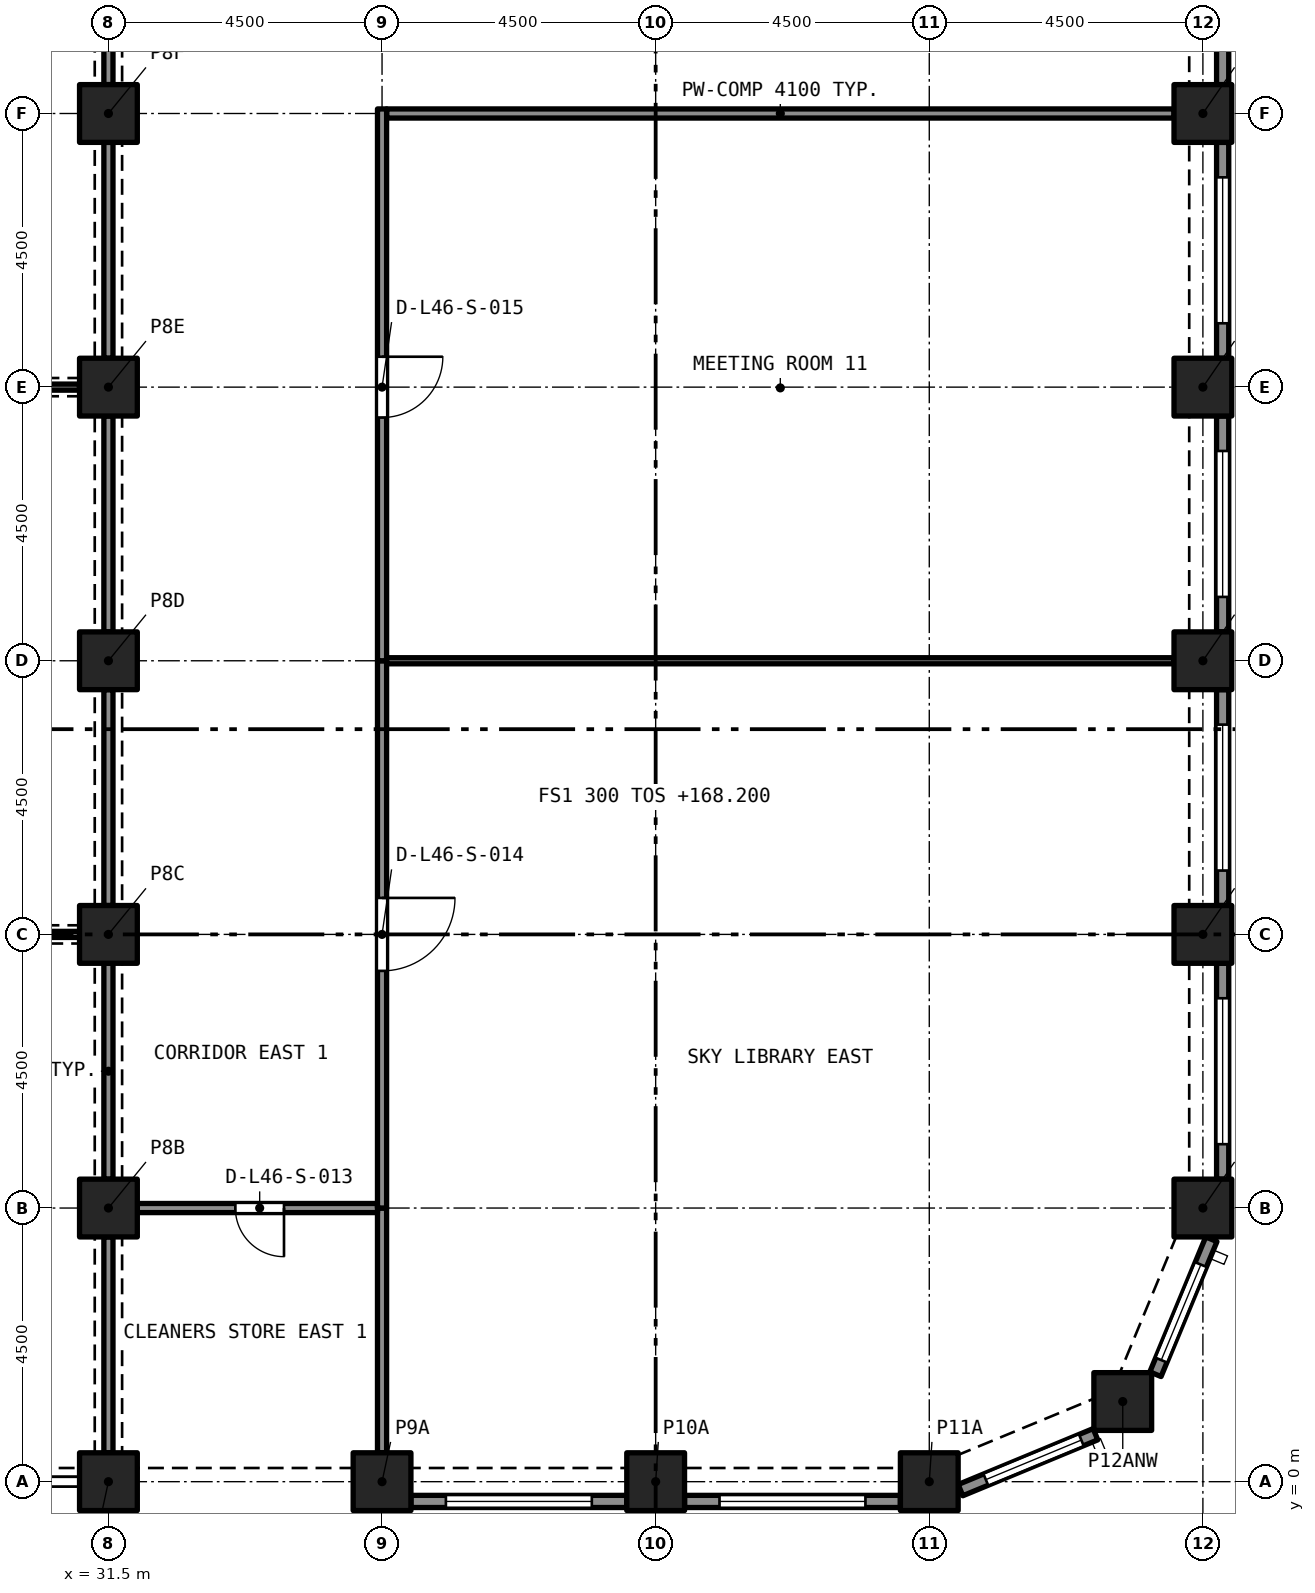
"""IFC4 building model, lengths in metres.
Left out: names, types, materials, properties, quantities, classifications, styles, units other than length and angle.
Written with IfcOpenShell. Run it as: python <this file> out.ifc"""

import sys

from ifc_helpers import new_model, si_unit, direction, frame, frame_2d, origin, origin_2d, place, context, subcontext, project, spatial, rectangle, extrude, element, fill, save


model = new_model("IFC4")
c1 = context("Model", 3, precision=1e-05, world=origin(), true_north=direction((0.0, 1.0)))
c2 = subcontext(c1, "Body", "Model", "MODEL_VIEW")
j1 = project(units=[si_unit("LENGTHUNIT", "METRE"), si_unit("PLANEANGLEUNIT", "RADIAN")], contexts=[c1])
p1 = place(None, origin())
s1 = spatial("IfcSite", under=j1, at=p1, CompositionType="ELEMENT")
p2 = place(p1, origin())
s2 = spatial("IfcBuilding", under=s1, at=p2, CompositionType="ELEMENT")
p3 = place(p2, frame((0.0, 0.0, 168.2)))
s3 = spatial("IfcBuildingStorey", under=s2, at=p3, CompositionType="ELEMENT", Elevation=168.2)
for number, where, z_axis, x_axis in (
    (1, (31.5, 0.0, 0.0), (0.0, 0.0, 1.0), (1.0, 0.0, 0.0)),
    (2, (36.0, 0.0, 0.0), (0.0, 0.0, 1.0), (1.0, 0.0, 0.0)),
    (3, (40.5, 0.0, 0.0), (0.0, 0.0, 1.0), (1.0, 0.0, 0.0)),
    (4, (45.0, 0.0, 0.0), (0.0, 0.0, 1.0), (1.0, 0.0, 0.0)),
    (5, (48.182, 1.318, 0.0), (0.0, 0.0, 1.0), (1.0, 0.0, 0.0)),
    (6, (31.5, 4.5, 0.0), (0.0, 0.0, 1.0), (1.0, 0.0, 0.0)),
    (7, (49.5, 4.5, 0.0), (0.0, 0.0, 1.0), (1.0, 0.0, 0.0)),
    (8, (31.5, 9.0, 0.0), (0.0, 0.0, 1.0), (1.0, 0.0, 0.0)),
    (9, (49.5, 9.0, 0.0), (0.0, 0.0, 1.0), (1.0, 0.0, 0.0)),
    (10, (31.5, 13.5, 0.0), (0.0, 0.0, 1.0), (1.0, 0.0, 0.0)),
    (11, (49.5, 13.5, 0.0), (0.0, 0.0, 1.0), (1.0, 0.0, 0.0)),
    (12, (31.5, 18.0, 0.0), (0.0, 0.0, 1.0), (1.0, 0.0, 0.0)),
    (13, (49.5, 18.0, 0.0), (0.0, 0.0, 1.0), (1.0, 0.0, 0.0)),
    (14, (31.5, 22.5, 0.0), (0.0, 0.0, 1.0), (1.0, 0.0, 0.0)),
    (15, (49.5, 22.5, 0.0), (0.0, 0.0, 1.0), (1.0, 0.0, 0.0)),
):
    element("IfcColumn", number, at=place(p3, frame(where, z_axis=z_axis, x_axis=x_axis)), inside=s3, PredefinedType="COLUMN", context=c2, shape_type="SweptSolid", body=[
        extrude(rectangle(XDim=0.95, YDim=0.95, at=origin_2d()), origin(), (0.0, 0.0, 1.0), 4.4),
    ])
p4 = place(p3, frame((40.025, -0.325, 0.0), z_axis=(0.0, 0.0, 1.0), x_axis=(-1.0, 0.0, 0.0)))
e16 = element("IfcWall", 16, at=p4, inside=s3, PredefinedType="SOLIDWALL", context=c2, shape_type="SweptSolid", body=[
    extrude(rectangle(XDim=3.55, YDim=0.2, at=frame_2d((1.775, 0.0))), origin(), (0.0, 0.0, 1.0), 4.4),
])
p5 = place(p4, frame((0.575, 0.0, 0.45)))
e17 = element("IfcOpeningElement", 17, at=p5, cuts=e16, PredefinedType="OPENING", context=c2, shape_type="SweptSolid", body=[
    extrude(rectangle(XDim=2.4, YDim=2.55, at=frame_2d((1.2, 1.275))), frame((0.0, 0.11, 0.0), z_axis=(0.0, -1.0, 0.0), x_axis=(1.0, 0.0, 0.0)), (0.0, 0.0, 1.0), 0.22),
])
p6 = place(p3, frame((44.525, -0.325, 0.0), z_axis=(0.0, 0.0, 1.0), x_axis=(-1.0, 0.0, 0.0)))
e18 = element("IfcWall", 18, at=p6, inside=s3, PredefinedType="SOLIDWALL", context=c2, shape_type="SweptSolid", body=[
    extrude(rectangle(XDim=3.55, YDim=0.2, at=frame_2d((1.775, 0.0))), origin(), (0.0, 0.0, 1.0), 4.4),
])
p7 = place(p6, frame((0.575, 0.0, 0.45)))
e19 = element("IfcOpeningElement", 19, at=p7, cuts=e18, PredefinedType="OPENING", context=c2, shape_type="SweptSolid", body=[
    extrude(rectangle(XDim=2.4, YDim=2.55, at=frame_2d((1.2, 1.275))), frame((0.0, 0.11, 0.0), z_axis=(0.0, -1.0, 0.0), x_axis=(1.0, 0.0, 0.0)), (0.0, 0.0, 1.0), 0.22),
])
p8 = place(p3, frame((47.733, 0.78, 0.0), z_axis=(0.0, 0.0, 1.0), x_axis=(-0.923880599843, -0.382680855588, 0.0)))
e20 = element("IfcWall", 20, at=p8, inside=s3, PredefinedType="SOLIDWALL", context=c2, shape_type="SweptSolid", body=[
    extrude(rectangle(XDim=2.403, YDim=0.2, at=frame_2d((1.201, 0.0))), origin(), (0.0, 0.0, 1.0), 4.4),
])
p9 = place(p8, frame((0.251, 0.0, 0.45)))
e21 = element("IfcOpeningElement", 21, at=p9, cuts=e20, PredefinedType="OPENING", context=c2, shape_type="SweptSolid", body=[
    extrude(rectangle(XDim=1.7, YDim=2.55, at=frame_2d((0.85, 1.275))), frame((0.0, 0.11, 0.0), z_axis=(0.0, -1.0, 0.0), x_axis=(1.0, 0.0, 0.0)), (0.0, 0.0, 1.0), 0.22),
])
p10 = place(p3, frame((49.639, 3.987, 0.0), z_axis=(0.0, 0.0, 1.0), x_axis=(-0.382680855588, -0.923880599843, 0.0)))
e22 = element("IfcWall", 22, at=p10, inside=s3, PredefinedType="SOLIDWALL", context=c2, shape_type="SweptSolid", body=[
    extrude(rectangle(XDim=2.403, YDim=0.2, at=frame_2d((1.201, 0.0))), origin(), (0.0, 0.0, 1.0), 4.4),
])
p11 = place(p10, frame((0.451, 0.0, 0.45)))
e23 = element("IfcOpeningElement", 23, at=p11, cuts=e22, PredefinedType="OPENING", context=c2, shape_type="SweptSolid", body=[
    extrude(rectangle(XDim=1.7, YDim=2.55, at=frame_2d((0.85, 1.275))), frame((0.0, 0.11, 0.0), z_axis=(0.0, -1.0, 0.0), x_axis=(1.0, 0.0, 0.0)), (0.0, 0.0, 1.0), 0.22),
])
p12 = place(p3, frame((49.825, 8.525, 0.0), z_axis=(0.0, 0.0, 1.0), x_axis=(0.0, -1.0, 0.0)))
e24 = element("IfcWall", 24, at=p12, inside=s3, PredefinedType="SOLIDWALL", context=c2, shape_type="SweptSolid", body=[
    extrude(rectangle(XDim=3.55, YDim=0.2, at=frame_2d((1.775, 0.0))), origin(), (0.0, 0.0, 1.0), 4.4),
])
p13 = place(p12, frame((0.575, 0.0, 0.45)))
e25 = element("IfcOpeningElement", 25, at=p13, cuts=e24, PredefinedType="OPENING", context=c2, shape_type="SweptSolid", body=[
    extrude(rectangle(XDim=2.4, YDim=2.55, at=frame_2d((1.2, 1.275))), frame((0.0, 0.11, 0.0), z_axis=(0.0, -1.0, 0.0), x_axis=(1.0, 0.0, 0.0)), (0.0, 0.0, 1.0), 0.22),
])
p14 = place(p3, frame((49.825, 13.025, 0.0), z_axis=(0.0, 0.0, 1.0), x_axis=(0.0, -1.0, 0.0)))
e26 = element("IfcWall", 26, at=p14, inside=s3, PredefinedType="SOLIDWALL", context=c2, shape_type="SweptSolid", body=[
    extrude(rectangle(XDim=3.55, YDim=0.2, at=frame_2d((1.775, 0.0))), origin(), (0.0, 0.0, 1.0), 4.4),
])
p15 = place(p14, frame((0.575, 0.0, 0.45)))
e27 = element("IfcOpeningElement", 27, at=p15, cuts=e26, PredefinedType="OPENING", context=c2, shape_type="SweptSolid", body=[
    extrude(rectangle(XDim=2.4, YDim=2.55, at=frame_2d((1.2, 1.275))), frame((0.0, 0.11, 0.0), z_axis=(0.0, -1.0, 0.0), x_axis=(1.0, 0.0, 0.0)), (0.0, 0.0, 1.0), 0.22),
])
p16 = place(p3, frame((49.825, 17.525, 0.0), z_axis=(0.0, 0.0, 1.0), x_axis=(0.0, -1.0, 0.0)))
e28 = element("IfcWall", 28, at=p16, inside=s3, PredefinedType="SOLIDWALL", context=c2, shape_type="SweptSolid", body=[
    extrude(rectangle(XDim=3.55, YDim=0.2, at=frame_2d((1.775, 0.0))), origin(), (0.0, 0.0, 1.0), 4.4),
])
p17 = place(p16, frame((0.575, 0.0, 0.45)))
e29 = element("IfcOpeningElement", 29, at=p17, cuts=e28, PredefinedType="OPENING", context=c2, shape_type="SweptSolid", body=[
    extrude(rectangle(XDim=2.4, YDim=2.55, at=frame_2d((1.2, 1.275))), frame((0.0, 0.11, 0.0), z_axis=(0.0, -1.0, 0.0), x_axis=(1.0, 0.0, 0.0)), (0.0, 0.0, 1.0), 0.22),
])
p18 = place(p3, frame((49.825, 22.025, 0.0), z_axis=(0.0, 0.0, 1.0), x_axis=(0.0, -1.0, 0.0)))
e30 = element("IfcWall", 30, at=p18, inside=s3, PredefinedType="SOLIDWALL", context=c2, shape_type="SweptSolid", body=[
    extrude(rectangle(XDim=3.55, YDim=0.2, at=frame_2d((1.775, 0.0))), origin(), (0.0, 0.0, 1.0), 4.4),
])
p19 = place(p18, frame((0.575, 0.0, 0.45)))
e31 = element("IfcOpeningElement", 31, at=p19, cuts=e30, PredefinedType="OPENING", context=c2, shape_type="SweptSolid", body=[
    extrude(rectangle(XDim=2.4, YDim=2.55, at=frame_2d((1.2, 1.275))), frame((0.0, 0.11, 0.0), z_axis=(0.0, -1.0, 0.0), x_axis=(1.0, 0.0, 0.0)), (0.0, 0.0, 1.0), 0.22),
])
p20 = place(p3, frame((49.825, 26.525, 0.0), z_axis=(0.0, 0.0, 1.0), x_axis=(0.0, -1.0, 0.0)))
e32 = element("IfcWall", 32, at=p20, inside=s3, PredefinedType="SOLIDWALL", context=c2, shape_type="SweptSolid", body=[
    extrude(rectangle(XDim=3.55, YDim=0.2, at=frame_2d((1.775, 0.0))), origin(), (0.0, 0.0, 1.0), 4.4),
])
p21 = place(p20, frame((0.575, 0.0, 0.45)))
e33 = element("IfcOpeningElement", 33, at=p21, cuts=e32, PredefinedType="OPENING", context=c2, shape_type="SweptSolid", body=[
    extrude(rectangle(XDim=2.4, YDim=2.55, at=frame_2d((1.2, 1.275))), frame((0.0, 0.11, 0.0), z_axis=(0.0, -1.0, 0.0), x_axis=(1.0, 0.0, 0.0)), (0.0, 0.0, 1.0), 0.22),
])
p22 = place(p3, frame((18.475, 9.0, 0.0), z_axis=(0.0, 0.0, 1.0), x_axis=(1.0, 0.0, 0.0)))
e34 = element("IfcWall", 34, at=p22, inside=s3, PredefinedType="PARTITIONING", context=c2, shape_type="SweptSolid", body=[
    extrude(rectangle(XDim=12.55, YDim=0.1, at=frame_2d((6.275, 0.0))), origin(), (0.0, 0.0, 1.0), 3.95),
])
for number, where, z_axis, x_axis in (
    (35, (31.5, 0.475, 0.0), (0.0, 0.0, 1.0), (0.0, 1.0, 0.0)),
    (36, (31.5, 4.975, 0.0), (0.0, 0.0, 1.0), (0.0, 1.0, 0.0)),
):
    element("IfcWall", number, at=place(p3, frame(where, z_axis=z_axis, x_axis=x_axis)), inside=s3, PredefinedType="PARTITIONING", context=c2, shape_type="SweptSolid", body=[
        extrude(rectangle(XDim=3.55, YDim=0.15, at=frame_2d((1.775, 0.0))), origin(), (0.0, 0.0, 1.0), 3.58),
    ])
p23 = place(p3, frame((18.475, 18.0, 0.0), z_axis=(0.0, 0.0, 1.0), x_axis=(1.0, 0.0, 0.0)))
e37 = element("IfcWall", 37, at=p23, inside=s3, PredefinedType="PARTITIONING", context=c2, shape_type="SweptSolid", body=[
    extrude(rectangle(XDim=12.55, YDim=0.1, at=frame_2d((6.275, 0.0))), origin(), (0.0, 0.0, 1.0), 3.95),
])
for number, where, z_axis, x_axis in (
    (38, (31.5, 13.975, 0.0), (0.0, 0.0, 1.0), (0.0, 1.0, 0.0)),
    (39, (31.5, 9.475, 0.0), (0.0, 0.0, 1.0), (0.0, 1.0, 0.0)),
):
    element("IfcWall", number, at=place(p3, frame(where, z_axis=z_axis, x_axis=x_axis)), inside=s3, PredefinedType="PARTITIONING", context=c2, shape_type="SweptSolid", body=[
        extrude(rectangle(XDim=3.55, YDim=0.15, at=frame_2d((1.775, 0.0))), origin(), (0.0, 0.0, 1.0), 3.58),
    ])
p24 = place(p3, frame((31.5, 22.975, 0.0), z_axis=(0.0, 0.0, 1.0), x_axis=(0.0, 1.0, 0.0)))
e40 = element("IfcWall", 40, at=p24, inside=s3, PredefinedType="PARTITIONING", context=c2, shape_type="SweptSolid", body=[
    extrude(rectangle(XDim=3.55, YDim=0.15, at=frame_2d((1.775, 0.0))), origin(), (0.0, 0.0, 1.0), 3.58),
])
p25 = place(p24, frame((1.175, 0.0, 0.0)))
e41 = element("IfcOpeningElement", 41, at=p25, cuts=e40, PredefinedType="OPENING", context=c2, shape_type="SweptSolid", body=[
    extrude(rectangle(XDim=1.2, YDim=2.1, at=frame_2d((0.6, 1.05))), frame((0.0, 0.085, 0.0), z_axis=(0.0, -1.0, 0.0), x_axis=(1.0, 0.0, 0.0)), (0.0, 0.0, 1.0), 0.17),
])
p26 = place(p3, frame((31.5, 18.475, 0.0), z_axis=(0.0, 0.0, 1.0), x_axis=(0.0, 1.0, 0.0)))
e42 = element("IfcWall", 42, at=p26, inside=s3, PredefinedType="PARTITIONING", context=c2, shape_type="SweptSolid", body=[
    extrude(rectangle(XDim=3.55, YDim=0.15, at=frame_2d((1.775, 0.0))), origin(), (0.0, 0.0, 1.0), 3.58),
])
p27 = place(p3, frame((36.075, 22.5, 0.0), z_axis=(0.0, 0.0, 1.0), x_axis=(1.0, 0.0, 0.0)))
e43 = element("IfcWall", 43, at=p27, inside=s3, PredefinedType="PARTITIONING", context=c2, shape_type="SweptSolid", body=[
    extrude(rectangle(XDim=12.95, YDim=0.15, at=frame_2d((6.475, 0.0))), origin(), (0.0, 0.0, 1.0), 4.1),
])
p28 = place(p3, frame((36.0, 0.475, 0.0), z_axis=(0.0, 0.0, 1.0), x_axis=(0.0, 1.0, 0.0)))
e44 = element("IfcWall", 44, at=p28, inside=s3, PredefinedType="PARTITIONING", context=c2, shape_type="SweptSolid", body=[
    extrude(rectangle(XDim=4.025, YDim=0.15, at=frame_2d((2.012, 0.0))), origin(), (0.0, 0.0, 1.0), 4.1),
])
p29 = place(p3, frame((35.925, 4.5, 0.0), z_axis=(0.0, 0.0, 1.0), x_axis=(-1.0, 0.0, 0.0)))
e45 = element("IfcWall", 45, at=p29, inside=s3, PredefinedType="PARTITIONING", context=c2, shape_type="SweptSolid", body=[
    extrude(rectangle(XDim=3.95, YDim=0.15, at=frame_2d((1.975, 0.0))), origin(), (0.0, 0.0, 1.0), 4.1),
])
p30 = place(p29, frame((1.538, 0.0, 0.0)))
e46 = element("IfcOpeningElement", 46, at=p30, cuts=e45, PredefinedType="OPENING", context=c2, shape_type="SweptSolid", body=[
    extrude(rectangle(XDim=0.8, YDim=2.1, at=frame_2d((0.4, 1.05))), frame((0.0, 0.085, 0.0), z_axis=(0.0, -1.0, 0.0), x_axis=(1.0, 0.0, 0.0)), (0.0, 0.0, 1.0), 0.17),
])
p31 = place(p3, frame((36.0, 13.5, 0.0), z_axis=(0.0, 0.0, 1.0), x_axis=(0.0, -1.0, 0.0)))
e47 = element("IfcWall", 47, at=p31, inside=s3, PredefinedType="PARTITIONING", context=c2, shape_type="SweptSolid", body=[
    extrude(rectangle(XDim=9.0, YDim=0.15, at=frame_2d((4.5, 0.0))), origin(), (0.0, 0.0, 1.0), 4.1),
])
p32 = place(p31, frame((3.9, 0.0, 0.0)))
e48 = element("IfcOpeningElement", 48, at=p32, cuts=e47, PredefinedType="OPENING", context=c2, shape_type="SweptSolid", body=[
    extrude(rectangle(XDim=1.2, YDim=2.1, at=frame_2d((0.6, 1.05))), frame((0.0, 0.085, 0.0), z_axis=(0.0, -1.0, 0.0), x_axis=(1.0, 0.0, 0.0)), (0.0, 0.0, 1.0), 0.17),
])
p33 = place(p3, frame((36.0, 22.575, 0.0), z_axis=(0.0, 0.0, 1.0), x_axis=(0.0, -1.0, 0.0)))
e49 = element("IfcWall", 49, at=p33, inside=s3, PredefinedType="PARTITIONING", context=c2, shape_type="SweptSolid", body=[
    extrude(rectangle(XDim=9.075, YDim=0.15, at=frame_2d((4.538, 0.0))), origin(), (0.0, 0.0, 1.0), 4.1),
])
p34 = place(p33, frame((4.075, 0.0, 0.0)))
e50 = element("IfcOpeningElement", 50, at=p34, cuts=e49, PredefinedType="OPENING", context=c2, shape_type="SweptSolid", body=[
    extrude(rectangle(XDim=1.0, YDim=2.1, at=frame_2d((0.5, 1.05))), frame((0.0, 0.085, 0.0), z_axis=(0.0, -1.0, 0.0), x_axis=(1.0, 0.0, 0.0)), (0.0, 0.0, 1.0), 0.17),
])
p35 = place(p3, frame((36.075, 13.5, 0.0), z_axis=(0.0, 0.0, 1.0), x_axis=(1.0, 0.0, 0.0)))
e51 = element("IfcWall", 51, at=p35, inside=s3, PredefinedType="PARTITIONING", context=c2, shape_type="SweptSolid", body=[
    extrude(rectangle(XDim=12.95, YDim=0.1, at=frame_2d((6.475, 0.0))), origin(), (0.0, 0.0, 1.0), 4.1),
])
p36 = place(p5, origin())
e52 = element("IfcWindow", 52, at=p36, inside=s3, PartitioningType="SINGLE_PANEL", PredefinedType="WINDOW", context=c2, shape_type="SweptSolid", body=[
    extrude(rectangle(XDim=2.4, YDim=2.55, at=frame_2d((1.2, 1.275))), frame((0.0, 0.03, 0.0), z_axis=(0.0, -1.0, 0.0), x_axis=(1.0, 0.0, 0.0)), (0.0, 0.0, 1.0), 0.06),
])
fill(e17, e52)
p37 = place(p7, origin())
e53 = element("IfcWindow", 53, at=p37, inside=s3, PartitioningType="SINGLE_PANEL", PredefinedType="WINDOW", context=c2, shape_type="SweptSolid", body=[
    extrude(rectangle(XDim=2.4, YDim=2.55, at=frame_2d((1.2, 1.275))), frame((0.0, 0.03, 0.0), z_axis=(0.0, -1.0, 0.0), x_axis=(1.0, 0.0, 0.0)), (0.0, 0.0, 1.0), 0.06),
])
fill(e19, e53)
p38 = place(p9, origin())
e54 = element("IfcWindow", 54, at=p38, inside=s3, PartitioningType="SINGLE_PANEL", PredefinedType="WINDOW", context=c2, shape_type="SweptSolid", body=[
    extrude(rectangle(XDim=1.7, YDim=2.55, at=frame_2d((0.85, 1.275))), frame((0.0, 0.03, 0.0), z_axis=(0.0, -1.0, 0.0), x_axis=(1.0, 0.0, 0.0)), (0.0, 0.0, 1.0), 0.06),
])
fill(e21, e54)
p39 = place(p11, origin())
e55 = element("IfcWindow", 55, at=p39, inside=s3, PartitioningType="SINGLE_PANEL", PredefinedType="WINDOW", context=c2, shape_type="SweptSolid", body=[
    extrude(rectangle(XDim=1.7, YDim=2.55, at=frame_2d((0.85, 1.275))), frame((0.0, 0.03, 0.0), z_axis=(0.0, -1.0, 0.0), x_axis=(1.0, 0.0, 0.0)), (0.0, 0.0, 1.0), 0.06),
])
fill(e23, e55)
p40 = place(p13, origin())
e56 = element("IfcWindow", 56, at=p40, inside=s3, PartitioningType="SINGLE_PANEL", PredefinedType="WINDOW", context=c2, shape_type="SweptSolid", body=[
    extrude(rectangle(XDim=2.4, YDim=2.55, at=frame_2d((1.2, 1.275))), frame((0.0, 0.03, 0.0), z_axis=(0.0, -1.0, 0.0), x_axis=(1.0, 0.0, 0.0)), (0.0, 0.0, 1.0), 0.06),
])
fill(e25, e56)
p41 = place(p15, origin())
e57 = element("IfcWindow", 57, at=p41, inside=s3, PartitioningType="SINGLE_PANEL", PredefinedType="WINDOW", context=c2, shape_type="SweptSolid", body=[
    extrude(rectangle(XDim=2.4, YDim=2.55, at=frame_2d((1.2, 1.275))), frame((0.0, 0.03, 0.0), z_axis=(0.0, -1.0, 0.0), x_axis=(1.0, 0.0, 0.0)), (0.0, 0.0, 1.0), 0.06),
])
fill(e27, e57)
p42 = place(p17, origin())
e58 = element("IfcWindow", 58, at=p42, inside=s3, PartitioningType="SINGLE_PANEL", PredefinedType="WINDOW", context=c2, shape_type="SweptSolid", body=[
    extrude(rectangle(XDim=2.4, YDim=2.55, at=frame_2d((1.2, 1.275))), frame((0.0, 0.03, 0.0), z_axis=(0.0, -1.0, 0.0), x_axis=(1.0, 0.0, 0.0)), (0.0, 0.0, 1.0), 0.06),
])
fill(e29, e58)
p43 = place(p19, origin())
e59 = element("IfcWindow", 59, at=p43, inside=s3, PartitioningType="SINGLE_PANEL", PredefinedType="WINDOW", context=c2, shape_type="SweptSolid", body=[
    extrude(rectangle(XDim=2.4, YDim=2.55, at=frame_2d((1.2, 1.275))), frame((0.0, 0.03, 0.0), z_axis=(0.0, -1.0, 0.0), x_axis=(1.0, 0.0, 0.0)), (0.0, 0.0, 1.0), 0.06),
])
fill(e31, e59)
p44 = place(p30, origin())
e60 = element("IfcDoor", 60, at=p44, inside=s3, OperationType="SINGLE_SWING_LEFT", PredefinedType="DOOR", context=c2, shape_type="SweptSolid", body=[
    extrude(rectangle(XDim=0.8, YDim=2.1, at=frame_2d((0.4, 1.05))), frame((0.0, 0.025, 0.0), z_axis=(0.0, -1.0, 0.0), x_axis=(1.0, 0.0, 0.0)), (0.0, 0.0, 1.0), 0.05),
])
fill(e46, e60)
p45 = place(p32, origin())
e61 = element("IfcDoor", 61, at=p45, inside=s3, OperationType="SINGLE_SWING_RIGHT", PredefinedType="DOOR", context=c2, shape_type="SweptSolid", body=[
    extrude(rectangle(XDim=1.2, YDim=2.1, at=frame_2d((0.6, 1.05))), frame((0.0, 0.025, 0.0), z_axis=(0.0, -1.0, 0.0), x_axis=(1.0, 0.0, 0.0)), (0.0, 0.0, 1.0), 0.05),
])
fill(e48, e61)
p46 = place(p34, origin())
e62 = element("IfcDoor", 62, at=p46, inside=s3, OperationType="SINGLE_SWING_RIGHT", PredefinedType="DOOR", context=c2, shape_type="SweptSolid", body=[
    extrude(rectangle(XDim=1.0, YDim=2.1, at=frame_2d((0.5, 1.05))), frame((0.0, 0.025, 0.0), z_axis=(0.0, -1.0, 0.0), x_axis=(1.0, 0.0, 0.0)), (0.0, 0.0, 1.0), 0.05),
])
fill(e50, e62)
save(model, sys.argv[1])
